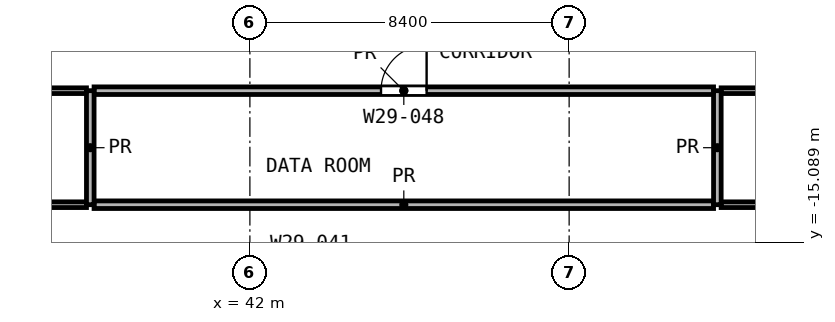
"""IFC4 building model, lengths in metres.
Left out: names, types, materials, properties, quantities, classifications, styles, units other than length and angle.
Written with IfcOpenShell. Run it as: python <this file> out.ifc"""

import sys

from ifc_helpers import new_model, si_unit, direction, frame, frame_2d, origin, place, context, subcontext, project, spatial, rectangle, extrude, element, fill, save


model = new_model("IFC4")
c1 = context("Model", 3, precision=1e-05, world=origin(), true_north=direction((0.0, 1.0)))
c2 = subcontext(c1, "Body", "Model", "MODEL_VIEW")
j1 = project(units=[si_unit("LENGTHUNIT", "METRE"), si_unit("PLANEANGLEUNIT", "RADIAN")], contexts=[c1])
p1 = place(None, origin())
s1 = spatial("IfcSite", under=j1, at=p1, CompositionType="ELEMENT")
p2 = place(p1, origin())
s2 = spatial("IfcBuilding", under=s1, at=p2, CompositionType="ELEMENT")
p3 = place(p2, frame((0.0, 0.0, 128.2)))
s3 = spatial("IfcBuildingStorey", under=s2, at=p3, CompositionType="ELEMENT", Elevation=128.2)
p4 = place(p3, frame((29.475, -14.1, 0.0), z_axis=(0.0, 0.0, 1.0), x_axis=(1.0, 0.0, 0.0)))
e1 = element("IfcWall", 1, at=p4, inside=s3, PredefinedType="PARTITIONING", context=c2, shape_type="SweptSolid", body=[
    extrude(rectangle(XDim=8.225, YDim=0.15, at=frame_2d((4.112, 0.0))), origin(), (0.0, 0.0, 1.0), 3.6),
])
p5 = place(p4, frame((5.725, 0.0, 0.0)))
e2 = element("IfcOpeningElement", 2, at=p5, cuts=e1, PredefinedType="OPENING", context=c2, shape_type="SweptSolid", body=[
    extrude(rectangle(XDim=1.0, YDim=2.1, at=frame_2d((0.5, 1.05))), frame((0.0, 0.085, 0.0), z_axis=(0.0, -1.0, 0.0), x_axis=(1.0, 0.0, 0.0)), (0.0, 0.0, 1.0), 0.17),
])
p6 = place(p3, frame((54.4, -14.1, 0.0), z_axis=(0.0, 0.0, 1.0), x_axis=(1.0, 0.0, 0.0)))
e3 = element("IfcWall", 3, at=p6, inside=s3, PredefinedType="PARTITIONING", context=c2, shape_type="SweptSolid", body=[
    extrude(rectangle(XDim=4.3, YDim=0.15, at=frame_2d((2.15, 0.0))), origin(), (0.0, 0.0, 1.0), 3.6),
])
p7 = place(p3, frame((29.475, -11.1, 0.0), z_axis=(0.0, 0.0, 1.0), x_axis=(1.0, 0.0, 0.0)))
e4 = element("IfcWall", 4, at=p7, inside=s3, PredefinedType="PARTITIONING", context=c2, shape_type="SweptSolid", body=[
    extrude(rectangle(XDim=8.225, YDim=0.15, at=frame_2d((4.112, 0.0))), origin(), (0.0, 0.0, 1.0), 3.6),
])
p8 = place(p7, frame((1.525, 0.0, 0.0)))
e5 = element("IfcOpeningElement", 5, at=p8, cuts=e4, PredefinedType="OPENING", context=c2, shape_type="SweptSolid", body=[
    extrude(rectangle(XDim=1.0, YDim=2.1, at=frame_2d((0.5, 1.05))), frame((0.0, 0.085, 0.0), z_axis=(0.0, -1.0, 0.0), x_axis=(1.0, 0.0, 0.0)), (0.0, 0.0, 1.0), 0.17),
])
p9 = place(p3, frame((54.4, -11.1, 0.0), z_axis=(0.0, 0.0, 1.0), x_axis=(1.0, 0.0, 0.0)))
e6 = element("IfcWall", 6, at=p9, inside=s3, PredefinedType="PARTITIONING", context=c2, shape_type="SweptSolid", body=[
    extrude(rectangle(XDim=4.3, YDim=0.15, at=frame_2d((2.15, 0.0))), origin(), (0.0, 0.0, 1.0), 3.6),
])
p10 = place(p9, frame((1.7, 0.0, 0.0)))
e7 = element("IfcOpeningElement", 7, at=p10, cuts=e6, PredefinedType="OPENING", context=c2, shape_type="SweptSolid", body=[
    extrude(rectangle(XDim=0.9, YDim=2.1, at=frame_2d((0.45, 1.05))), frame((0.0, 0.085, 0.0), z_axis=(0.0, -1.0, 0.0), x_axis=(1.0, 0.0, 0.0)), (0.0, 0.0, 1.0), 0.17),
])
p11 = place(p3, frame((37.9, -14.1, 0.0), z_axis=(0.0, 0.0, 1.0), x_axis=(1.0, 0.0, 0.0)))
e8 = element("IfcWall", 8, at=p11, inside=s3, PredefinedType="PARTITIONING", context=c2, shape_type="SweptSolid", body=[
    extrude(rectangle(XDim=16.3, YDim=0.2, at=frame_2d((8.15, 0.0))), origin(), (0.0, 0.0, 1.0), 3.6),
])
p12 = place(p3, frame((37.9, -11.1, 0.0), z_axis=(0.0, 0.0, 1.0), x_axis=(1.0, 0.0, 0.0)))
e9 = element("IfcWall", 9, at=p12, inside=s3, PredefinedType="PARTITIONING", context=c2, shape_type="SweptSolid", body=[
    extrude(rectangle(XDim=16.3, YDim=0.2, at=frame_2d((8.15, 0.0))), origin(), (0.0, 0.0, 1.0), 3.6),
])
p13 = place(p12, frame((7.55, 0.0, 0.0)))
e10 = element("IfcOpeningElement", 10, at=p13, cuts=e9, PredefinedType="OPENING", context=c2, shape_type="SweptSolid", body=[
    extrude(rectangle(XDim=1.2, YDim=2.1, at=frame_2d((0.6, 1.05))), frame((0.0, 0.11, 0.0), z_axis=(0.0, -1.0, 0.0), x_axis=(1.0, 0.0, 0.0)), (0.0, 0.0, 1.0), 0.22),
])
for number, where, z_axis, x_axis in (
    (11, (37.8, -14.1, 0.0), (0.0, 0.0, 1.0), (0.0, 1.0, 0.0)),
    (12, (54.3, -14.1, 0.0), (0.0, 0.0, 1.0), (0.0, 1.0, 0.0)),
):
    element("IfcWall", number, at=place(p3, frame(where, z_axis=z_axis, x_axis=x_axis)), inside=s3, PredefinedType="PARTITIONING", context=c2, shape_type="SweptSolid", body=[
        extrude(rectangle(XDim=3.0, YDim=0.2, at=frame_2d((1.5, 0.0))), origin(), (0.0, 0.0, 1.0), 3.6),
    ])
p14 = place(p13, origin())
e13 = element("IfcDoor", 13, at=p14, inside=s3, OperationType="SINGLE_SWING_RIGHT", PredefinedType="DOOR", context=c2, shape_type="SweptSolid", body=[
    extrude(rectangle(XDim=1.2, YDim=2.1, at=frame_2d((0.6, 1.05))), frame((0.0, 0.025, 0.0), z_axis=(0.0, -1.0, 0.0), x_axis=(1.0, 0.0, 0.0)), (0.0, 0.0, 1.0), 0.05),
])
fill(e10, e13)
save(model, sys.argv[1])
